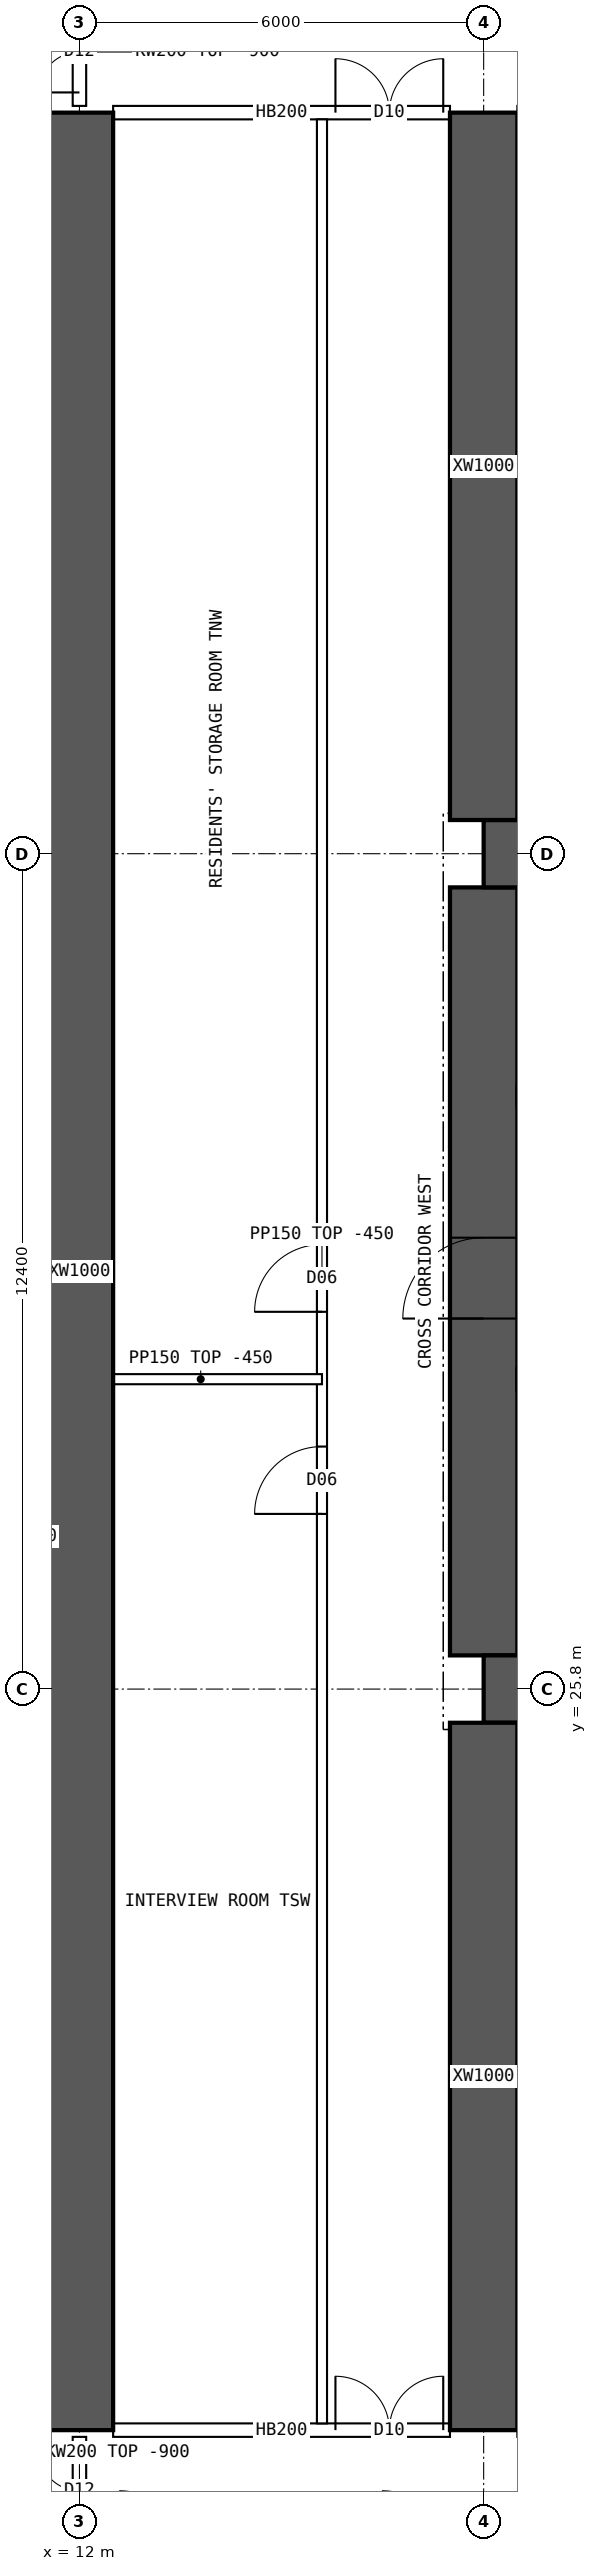
"""IFC4 building model, lengths in metres.
Left out: names, types, materials, properties, quantities, classifications, styles, units other than length and angle.
Written with IfcOpenShell. Run it as: python <this file> out.ifc"""

import sys

from ifc_helpers import new_model, si_unit, direction, frame, frame_2d, origin, place, context, subcontext, project, spatial, polyline, rectangle, outline, extrude, element, fill, save


model = new_model("IFC4")
c1 = context("Model", 3, precision=1e-05, world=origin(), true_north=direction((0.0, 1.0)))
c2 = subcontext(c1, "Body", "Model", "MODEL_VIEW")
j1 = project(units=[si_unit("LENGTHUNIT", "METRE"), si_unit("PLANEANGLEUNIT", "RADIAN")], contexts=[c1])
p1 = place(None, origin())
s1 = spatial("IfcSite", under=j1, at=p1, CompositionType="ELEMENT")
p2 = place(p1, origin())
s2 = spatial("IfcBuilding", under=s1, at=p2, CompositionType="ELEMENT")
p3 = place(p2, frame((0.0, 0.0, 35.2)))
s3 = spatial("IfcBuildingStorey", under=s2, at=p3, CompositionType="ELEMENT", Elevation=35.2)
for number, where, z_axis, x_axis in (
    (1, (18.0, 25.8, 0.0), (0.0, 0.0, 1.0), (1.0, 0.0, 0.0)),
    (2, (18.0, 38.2, 0.0), (0.0, 0.0, 1.0), (1.0, 0.0, 0.0)),
):
    element("IfcWall", number, at=place(p3, frame(where, z_axis=z_axis, x_axis=x_axis)), inside=s3, PredefinedType="SHEAR", context=c2, shape_type="SweptSolid", body=[
        extrude(rectangle(XDim=48.0, YDim=1.0, at=frame_2d((24.0, 0.0))), origin(), (0.0, 0.0, 1.0), 3.75),
    ])
p4 = place(p3, frame((18.0, 26.3, 0.0), z_axis=(0.0, 0.0, 1.0), x_axis=(0.0, 1.0, 0.0)))
e3 = element("IfcWall", 3, at=p4, inside=s3, PredefinedType="SHEAR", context=c2, shape_type="SweptSolid", body=[
    extrude(rectangle(XDim=11.4, YDim=1.0, at=frame_2d((5.7, 0.0))), origin(), (0.0, 0.0, 1.0), 3.75),
])
p5 = place(p4, frame((5.0, 0.0, 0.0)))
e4 = element("IfcOpeningElement", 4, at=p5, cuts=e3, PredefinedType="OPENING", context=c2, shape_type="SweptSolid", body=[
    extrude(rectangle(XDim=1.2, YDim=2.1, at=frame_2d((0.6, 1.05))), frame((0.0, 0.51, 0.0), z_axis=(0.0, -1.0, 0.0), x_axis=(1.0, 0.0, 0.0)), (0.0, 0.0, 1.0), 1.02),
])
p6 = place(p3, frame((12.0, 14.8, 0.0), z_axis=(0.0, 0.0, 1.0), x_axis=(0.0, 1.0, 0.0)))
e5 = element("IfcWall", 5, at=p6, inside=s3, PredefinedType="SHEAR", context=c2, shape_type="SweptSolid", body=[
    extrude(rectangle(XDim=34.4, YDim=1.0, at=frame_2d((17.2, 0.0))), origin(), (0.0, 0.0, 1.0), 3.75),
])
for number, where, z_axis, x_axis in (
    (6, (18.0, 14.8, 0.0), (0.0, 0.0, 1.0), (0.0, 1.0, 0.0)),
    (7, (18.0, 38.7, 0.0), (0.0, 0.0, 1.0), (0.0, 1.0, 0.0)),
):
    element("IfcWall", number, at=place(p3, frame(where, z_axis=z_axis, x_axis=x_axis)), inside=s3, PredefinedType="SHEAR", context=c2, shape_type="SweptSolid", body=[
        extrude(rectangle(XDim=10.5, YDim=1.0, at=frame_2d((5.25, 0.0))), origin(), (0.0, 0.0, 1.0), 3.75),
    ])
p7 = place(p3, frame((12.5, 14.8, 0.0), z_axis=(0.0, 0.0, 1.0), x_axis=(1.0, 0.0, 0.0)))
e8 = element("IfcWall", 8, at=p7, inside=s3, PredefinedType="SOLIDWALL", context=c2, shape_type="SweptSolid", body=[
    extrude(rectangle(XDim=5.0, YDim=0.2, at=frame_2d((2.5, 0.0))), origin(), (0.0, 0.0, 1.0), 3.3),
])
p8 = place(p7, frame((3.3, 0.0, 0.0)))
e9 = element("IfcOpeningElement", 9, at=p8, cuts=e8, PredefinedType="OPENING", context=c2, shape_type="SweptSolid", body=[
    extrude(rectangle(XDim=1.6, YDim=2.1, at=frame_2d((0.8, 1.05))), frame((0.0, 0.11, 0.0), z_axis=(0.0, -1.0, 0.0), x_axis=(1.0, 0.0, 0.0)), (0.0, 0.0, 1.0), 0.22),
])
p9 = place(p3, frame((12.5, 49.2, 0.0), z_axis=(0.0, 0.0, 1.0), x_axis=(1.0, 0.0, 0.0)))
e10 = element("IfcWall", 10, at=p9, inside=s3, PredefinedType="SOLIDWALL", context=c2, shape_type="SweptSolid", body=[
    extrude(rectangle(XDim=5.0, YDim=0.2, at=frame_2d((2.5, 0.0))), origin(), (0.0, 0.0, 1.0), 3.3),
])
p10 = place(p9, frame((3.3, 0.0, 0.0)))
e11 = element("IfcOpeningElement", 11, at=p10, cuts=e10, PredefinedType="OPENING", context=c2, shape_type="SweptSolid", body=[
    extrude(rectangle(XDim=1.6, YDim=2.1, at=frame_2d((0.8, 1.05))), frame((0.0, 0.11, 0.0), z_axis=(0.0, -1.0, 0.0), x_axis=(1.0, 0.0, 0.0)), (0.0, 0.0, 1.0), 0.22),
])
p11 = place(p3, frame((15.6, 14.9, 0.0), z_axis=(0.0, 0.0, 1.0), x_axis=(0.0, 1.0, 0.0)))
e12 = element("IfcWall", 12, at=p11, inside=s3, PredefinedType="PARTITIONING", context=c2, shape_type="SweptSolid", body=[
    extrude(rectangle(XDim=34.2, YDim=0.15, at=frame_2d((17.1, 0.0))), origin(), (0.0, 0.0, 1.0), 3.3),
])
p12 = place(p11, frame((13.5, 0.0, 0.0)))
e13 = element("IfcOpeningElement", 13, at=p12, cuts=e12, PredefinedType="OPENING", context=c2, shape_type="SweptSolid", body=[
    extrude(rectangle(XDim=1.0, YDim=2.1, at=frame_2d((0.5, 1.05))), frame((0.0, 0.085, 0.0), z_axis=(0.0, -1.0, 0.0), x_axis=(1.0, 0.0, 0.0)), (0.0, 0.0, 1.0), 0.17),
])
p13 = place(p11, frame((16.5, 0.0, 0.0)))
e14 = element("IfcOpeningElement", 14, at=p13, cuts=e12, PredefinedType="OPENING", context=c2, shape_type="SweptSolid", body=[
    extrude(rectangle(XDim=1.0, YDim=2.1, at=frame_2d((0.5, 1.05))), frame((0.0, 0.085, 0.0), z_axis=(0.0, -1.0, 0.0), x_axis=(1.0, 0.0, 0.0)), (0.0, 0.0, 1.0), 0.17),
])
p14 = place(p3, frame((12.0, 30.4, 0.0), z_axis=(0.0, 0.0, 1.0), x_axis=(1.0, 0.0, 0.0)))
e15 = element("IfcWall", 15, at=p14, inside=s3, PredefinedType="PARTITIONING", context=c2, shape_type="SweptSolid", body=[
    extrude(rectangle(XDim=3.6, YDim=0.15, at=frame_2d((1.8, 0.0))), origin(), (0.0, 0.0, 1.0), 3.3),
])
p15 = place(p3, frame((3.905, 30.85, 0.0), z_axis=(0.0, 0.0, 1.0), x_axis=(1.0, 0.0, 0.0)))
e16 = element("IfcWall", 16, at=p15, inside=s3, PredefinedType="PARTITIONING", context=c2, shape_type="SweptSolid", body=[
    extrude(outline(polyline([(0.0, 0.0), (8.02, 0.0), (8.02, 3.3), (2.397, 3.3), (2.395, 2.85), (1.797, 2.85), (1.795, 3.3), (0.0, 3.3), (0.0, 0.0)])), frame((0.0, 0.075, 0.0), z_axis=(0.0, -1.0, 0.0), x_axis=(1.0, 0.0, 0.0)), (0.0, 0.0, 1.0), 0.15),
])
p16 = place(p3, frame((12.0, 13.1, 0.0), z_axis=(0.0, 0.0, 1.0), x_axis=(0.0, 1.0, 0.0)))
e17 = element("IfcWall", 17, at=p16, inside=s3, PredefinedType="SOLIDWALL", context=c2, shape_type="SweptSolid", body=[
    extrude(outline(polyline([(0.0, 0.0), (1.6, 0.0), (1.6, 2.85), (0.0, 2.85), (0.0, 0.0)])), frame((0.0, 0.1, 0.0), z_axis=(0.0, -1.0, 0.0), x_axis=(1.0, 0.0, 0.0)), (0.0, 0.0, 1.0), 0.2),
])
p17 = place(p16, frame((0.2, 0.0, 0.0)))
e18 = element("IfcOpeningElement", 18, at=p17, cuts=e17, PredefinedType="OPENING", context=c2, shape_type="SweptSolid", body=[
    extrude(rectangle(XDim=1.2, YDim=2.1, at=frame_2d((0.6, 1.05))), frame((0.0, 0.11, 0.0), z_axis=(0.0, -1.0, 0.0), x_axis=(1.0, 0.0, 0.0)), (0.0, 0.0, 1.0), 0.22),
])
p18 = place(p3, frame((12.0, 49.3, 0.0), z_axis=(0.0, 0.0, 1.0), x_axis=(0.0, 1.0, 0.0)))
e19 = element("IfcWall", 19, at=p18, inside=s3, PredefinedType="SOLIDWALL", context=c2, shape_type="SweptSolid", body=[
    extrude(outline(polyline([(0.0, 0.0), (1.6, 0.0), (1.6, 2.85), (0.0, 2.85), (0.0, 0.0)])), frame((0.0, 0.1, 0.0), z_axis=(0.0, -1.0, 0.0), x_axis=(1.0, 0.0, 0.0)), (0.0, 0.0, 1.0), 0.2),
])
p19 = place(p18, frame((0.2, 0.0, 0.0)))
e20 = element("IfcOpeningElement", 20, at=p19, cuts=e19, PredefinedType="OPENING", context=c2, shape_type="SweptSolid", body=[
    extrude(rectangle(XDim=1.2, YDim=2.1, at=frame_2d((0.6, 1.05))), frame((0.0, 0.11, 0.0), z_axis=(0.0, -1.0, 0.0), x_axis=(1.0, 0.0, 0.0)), (0.0, 0.0, 1.0), 0.22),
])
p20 = place(p5, origin())
e21 = element("IfcDoor", 21, at=p20, inside=s3, OperationType="SINGLE_SWING_LEFT", PredefinedType="DOOR", context=c2, shape_type="SweptSolid", body=[
    extrude(rectangle(XDim=1.2, YDim=2.1, at=frame_2d((0.6, 1.05))), frame((0.0, 0.025, 0.0), z_axis=(0.0, -1.0, 0.0), x_axis=(1.0, 0.0, 0.0)), (0.0, 0.0, 1.0), 0.05),
])
fill(e4, e21)
p21 = place(p8, origin())
e22 = element("IfcDoor", 22, at=p21, inside=s3, OperationType="DOUBLE_DOOR_SINGLE_SWING", PredefinedType="DOOR", context=c2, shape_type="SweptSolid", body=[
    extrude(rectangle(XDim=1.6, YDim=2.1, at=frame_2d((0.8, 1.05))), frame((0.0, 0.025, 0.0), z_axis=(0.0, -1.0, 0.0), x_axis=(1.0, 0.0, 0.0)), (0.0, 0.0, 1.0), 0.05),
])
fill(e9, e22)
p22 = place(p10, origin())
e23 = element("IfcDoor", 23, at=p22, inside=s3, OperationType="DOUBLE_DOOR_SINGLE_SWING", PredefinedType="DOOR", context=c2, shape_type="SweptSolid", body=[
    extrude(rectangle(XDim=1.6, YDim=2.1, at=frame_2d((0.8, 1.05))), frame((0.0, 0.025, 0.0), z_axis=(0.0, -1.0, 0.0), x_axis=(1.0, 0.0, 0.0)), (0.0, 0.0, 1.0), 0.05),
])
fill(e11, e23)
p23 = place(p12, origin())
e24 = element("IfcDoor", 24, at=p23, inside=s3, OperationType="SINGLE_SWING_LEFT", PredefinedType="DOOR", context=c2, shape_type="SweptSolid", body=[
    extrude(rectangle(XDim=1.0, YDim=2.1, at=frame_2d((0.5, 1.05))), frame((0.0, 0.025, 0.0), z_axis=(0.0, -1.0, 0.0), x_axis=(1.0, 0.0, 0.0)), (0.0, 0.0, 1.0), 0.05),
])
fill(e13, e24)
p24 = place(p13, origin())
e25 = element("IfcDoor", 25, at=p24, inside=s3, OperationType="SINGLE_SWING_LEFT", PredefinedType="DOOR", context=c2, shape_type="SweptSolid", body=[
    extrude(rectangle(XDim=1.0, YDim=2.1, at=frame_2d((0.5, 1.05))), frame((0.0, 0.025, 0.0), z_axis=(0.0, -1.0, 0.0), x_axis=(1.0, 0.0, 0.0)), (0.0, 0.0, 1.0), 0.05),
])
fill(e14, e25)
p25 = place(p17, origin())
e26 = element("IfcDoor", 26, at=p25, inside=s3, OperationType="DOUBLE_DOOR_SINGLE_SWING", PredefinedType="DOOR", context=c2, shape_type="SweptSolid", body=[
    extrude(rectangle(XDim=1.2, YDim=2.1, at=frame_2d((0.6, 1.05))), frame((0.0, 0.025, 0.0), z_axis=(0.0, -1.0, 0.0), x_axis=(1.0, 0.0, 0.0)), (0.0, 0.0, 1.0), 0.05),
])
fill(e18, e26)
p26 = place(p19, origin())
e27 = element("IfcDoor", 27, at=p26, inside=s3, OperationType="DOUBLE_DOOR_SINGLE_SWING", PredefinedType="DOOR", context=c2, shape_type="SweptSolid", body=[
    extrude(rectangle(XDim=1.2, YDim=2.1, at=frame_2d((0.6, 1.05))), frame((0.0, 0.025, 0.0), z_axis=(0.0, -1.0, 0.0), x_axis=(1.0, 0.0, 0.0)), (0.0, 0.0, 1.0), 0.05),
])
fill(e20, e27)
save(model, sys.argv[1])
